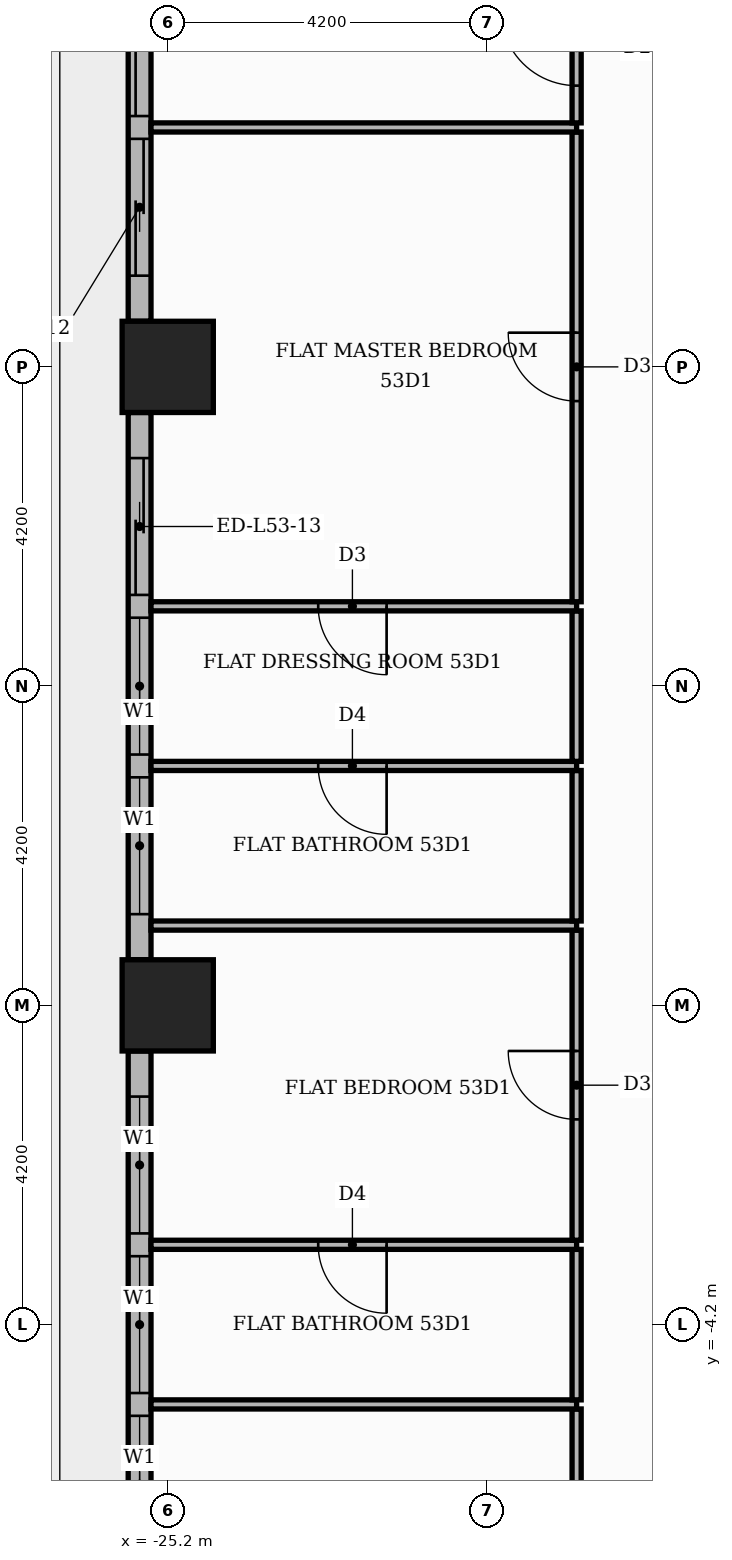
"""IFC4 building model, lengths in metres.
Left out: names, types, materials, properties, quantities, classifications, styles, units other than length and angle.
Written with IfcOpenShell. Run it as: python <this file> out.ifc"""

import sys

from ifc_helpers import new_model, si_unit, direction, frame, frame_2d, origin, origin_2d, place, context, subcontext, project, spatial, rectangle, extrude, element, fill, save


model = new_model("IFC4")
c1 = context("Model", 3, precision=1e-05, world=origin(), true_north=direction((0.0, 1.0)))
c2 = subcontext(c1, "Body", "Model", "MODEL_VIEW")
j1 = project(units=[si_unit("LENGTHUNIT", "METRE"), si_unit("PLANEANGLEUNIT", "RADIAN")], contexts=[c1])
p1 = place(None, origin())
s1 = spatial("IfcSite", under=j1, at=p1, CompositionType="ELEMENT")
p2 = place(p1, origin())
s2 = spatial("IfcBuilding", under=s1, at=p2, CompositionType="ELEMENT")
p3 = place(p2, frame((0.0, 0.0, 223.5)))
s3 = spatial("IfcBuildingStorey", under=s2, at=p3, CompositionType="ELEMENT", Elevation=223.5)
for number, where, z_axis, x_axis in (
    (1, (-25.2, 0.0, 0.0), (0.0, 0.0, 1.0), (1.0, 0.0, 0.0)),
    (2, (-25.2, 8.4, 0.0), (0.0, 0.0, 1.0), (1.0, 0.0, 0.0)),
):
    element("IfcColumn", number, at=place(p3, frame(where, z_axis=z_axis, x_axis=x_axis)), inside=s3, PredefinedType="COLUMN", context=c2, shape_type="SweptSolid", body=[
        extrude(rectangle(XDim=1.2, YDim=1.2, at=origin_2d()), origin(), (0.0, 0.0, 1.0), 3.9),
    ])
p4 = place(p3, frame((-25.57, 16.2, 0.0), z_axis=(0.0, 0.0, 1.0), x_axis=(0.0, -1.0, 0.0)))
e3 = element("IfcWall", 3, at=p4, inside=s3, PredefinedType="STANDARD", context=c2, shape_type="SweptSolid", body=[
    extrude(rectangle(XDim=7.2, YDim=0.3, at=frame_2d((3.6, 0.0))), origin(), (0.0, 0.0, 1.0), 3.48),
])
p5 = place(p4, frame((0.6, 0.0, 0.0)))
e4 = element("IfcOpeningElement", 4, at=p5, cuts=e3, PredefinedType="OPENING", context=c2, shape_type="SweptSolid", body=[
    extrude(rectangle(XDim=3.9, YDim=2.4, at=frame_2d((1.95, 1.2))), frame((0.0, 0.16, 0.0), z_axis=(0.0, -1.0, 0.0), x_axis=(1.0, 0.0, 0.0)), (0.0, 0.0, 1.0), 0.32),
])
p6 = place(p4, frame((4.8, 0.0, 0.0)))
e5 = element("IfcOpeningElement", 5, at=p6, cuts=e3, PredefinedType="OPENING", context=c2, shape_type="SweptSolid", body=[
    extrude(rectangle(XDim=1.8, YDim=2.4, at=frame_2d((0.9, 1.2))), frame((0.0, 0.16, 0.0), z_axis=(0.0, -1.0, 0.0), x_axis=(1.0, 0.0, 0.0)), (0.0, 0.0, 1.0), 0.32),
])
p7 = place(p3, frame((-25.57, 7.8, 0.0), z_axis=(0.0, 0.0, 1.0), x_axis=(0.0, -1.0, 0.0)))
e6 = element("IfcWall", 6, at=p7, inside=s3, PredefinedType="STANDARD", context=c2, shape_type="SweptSolid", body=[
    extrude(rectangle(XDim=7.2, YDim=0.3, at=frame_2d((3.6, 0.0))), origin(), (0.0, 0.0, 1.0), 3.48),
])
p8 = place(p7, frame((0.6, 0.0, 0.0)))
e7 = element("IfcOpeningElement", 7, at=p8, cuts=e6, PredefinedType="OPENING", context=c2, shape_type="SweptSolid", body=[
    extrude(rectangle(XDim=1.8, YDim=2.4, at=frame_2d((0.9, 1.2))), frame((0.0, 0.16, 0.0), z_axis=(0.0, -1.0, 0.0), x_axis=(1.0, 0.0, 0.0)), (0.0, 0.0, 1.0), 0.32),
])
p9 = place(p7, frame((2.7, 0.0, 0.9)))
e8 = element("IfcOpeningElement", 8, at=p9, cuts=e6, PredefinedType="OPENING", context=c2, shape_type="SweptSolid", body=[
    extrude(rectangle(XDim=1.8, YDim=2.1, at=frame_2d((0.9, 1.05))), frame((0.0, 0.16, 0.0), z_axis=(0.0, -1.0, 0.0), x_axis=(1.0, 0.0, 0.0)), (0.0, 0.0, 1.0), 0.32),
])
p10 = place(p7, frame((4.8, 0.0, 0.9)))
e9 = element("IfcOpeningElement", 9, at=p10, cuts=e6, PredefinedType="OPENING", context=c2, shape_type="SweptSolid", body=[
    extrude(rectangle(XDim=1.8, YDim=2.1, at=frame_2d((0.9, 1.05))), frame((0.0, 0.16, 0.0), z_axis=(0.0, -1.0, 0.0), x_axis=(1.0, 0.0, 0.0)), (0.0, 0.0, 1.0), 0.32),
])
p11 = place(p3, frame((-25.57, -0.6, 0.0), z_axis=(0.0, 0.0, 1.0), x_axis=(0.0, -1.0, 0.0)))
e10 = element("IfcWall", 10, at=p11, inside=s3, PredefinedType="STANDARD", context=c2, shape_type="SweptSolid", body=[
    extrude(rectangle(XDim=7.2, YDim=0.3, at=frame_2d((3.6, 0.0))), origin(), (0.0, 0.0, 1.0), 3.48),
])
p12 = place(p11, frame((0.6, 0.0, 0.9)))
e11 = element("IfcOpeningElement", 11, at=p12, cuts=e10, PredefinedType="OPENING", context=c2, shape_type="SweptSolid", body=[
    extrude(rectangle(XDim=1.8, YDim=2.1, at=frame_2d((0.9, 1.05))), frame((0.0, 0.16, 0.0), z_axis=(0.0, -1.0, 0.0), x_axis=(1.0, 0.0, 0.0)), (0.0, 0.0, 1.0), 0.32),
])
p13 = place(p11, frame((2.7, 0.0, 0.9)))
e12 = element("IfcOpeningElement", 12, at=p13, cuts=e10, PredefinedType="OPENING", context=c2, shape_type="SweptSolid", body=[
    extrude(rectangle(XDim=1.8, YDim=2.1, at=frame_2d((0.9, 1.05))), frame((0.0, 0.16, 0.0), z_axis=(0.0, -1.0, 0.0), x_axis=(1.0, 0.0, 0.0)), (0.0, 0.0, 1.0), 0.32),
])
p14 = place(p11, frame((4.8, 0.0, 0.9)))
e13 = element("IfcOpeningElement", 13, at=p14, cuts=e10, PredefinedType="OPENING", context=c2, shape_type="SweptSolid", body=[
    extrude(rectangle(XDim=1.8, YDim=2.1, at=frame_2d((0.9, 1.05))), frame((0.0, 0.16, 0.0), z_axis=(0.0, -1.0, 0.0), x_axis=(1.0, 0.0, 0.0)), (0.0, 0.0, 1.0), 0.32),
])
p15 = place(p3, frame((-19.82, -11.49, 0.0), z_axis=(0.0, 0.0, 1.0), x_axis=(0.0, 1.0, 0.0)))
e14 = element("IfcWall", 14, at=p15, inside=s3, PredefinedType="PARTITIONING", context=c2, shape_type="SweptSolid", body=[
    extrude(rectangle(XDim=6.18, YDim=0.12, at=frame_2d((3.09, 0.0))), origin(), (0.0, 0.0, 1.0), 3.48),
])
p16 = place(p15, frame((2.64, 0.0, 0.0)))
e15 = element("IfcOpeningElement", 15, at=p16, cuts=e14, PredefinedType="OPENING", context=c2, shape_type="SweptSolid", body=[
    extrude(rectangle(XDim=0.9, YDim=2.1, at=frame_2d((0.45, 1.05))), frame((0.0, 0.07, 0.0), z_axis=(0.0, -1.0, 0.0), x_axis=(1.0, 0.0, 0.0)), (0.0, 0.0, 1.0), 0.14),
])
p17 = place(p3, frame((-25.42, -5.25, 0.0), z_axis=(0.0, 0.0, 1.0), x_axis=(1.0, 0.0, 0.0)))
e16 = element("IfcWall", 16, at=p17, inside=s3, PredefinedType="PARTITIONING", context=c2, shape_type="SweptSolid", body=[
    extrude(rectangle(XDim=5.6, YDim=0.12, at=frame_2d((2.8, 0.0))), origin(), (0.0, 0.0, 1.0), 3.48),
])
p18 = place(p3, frame((-19.82, -5.19, 0.0), z_axis=(0.0, 0.0, 1.0), x_axis=(0.0, 1.0, 0.0)))
e17 = element("IfcWall", 17, at=p18, inside=s3, PredefinedType="PARTITIONING", context=c2, shape_type="SweptSolid", body=[
    extrude(rectangle(XDim=1.98, YDim=0.12, at=frame_2d((0.99, 0.0))), origin(), (0.0, 0.0, 1.0), 3.48),
])
p19 = place(p3, frame((-25.42, -3.15, 0.0), z_axis=(0.0, 0.0, 1.0), x_axis=(1.0, 0.0, 0.0)))
e18 = element("IfcWall", 18, at=p19, inside=s3, PredefinedType="PARTITIONING", context=c2, shape_type="SweptSolid", body=[
    extrude(rectangle(XDim=5.6, YDim=0.12, at=frame_2d((2.8, 0.0))), origin(), (0.0, 0.0, 1.0), 3.48),
])
p20 = place(p19, frame((2.2, 0.0, 0.0)))
e19 = element("IfcOpeningElement", 19, at=p20, cuts=e18, PredefinedType="OPENING", context=c2, shape_type="SweptSolid", body=[
    extrude(rectangle(XDim=0.9, YDim=2.1, at=frame_2d((0.45, 1.05))), frame((0.0, 0.07, 0.0), z_axis=(0.0, -1.0, 0.0), x_axis=(1.0, 0.0, 0.0)), (0.0, 0.0, 1.0), 0.14),
])
p21 = place(p3, frame((-19.82, -3.09, 0.0), z_axis=(0.0, 0.0, 1.0), x_axis=(0.0, 1.0, 0.0)))
e20 = element("IfcWall", 20, at=p21, inside=s3, PredefinedType="PARTITIONING", context=c2, shape_type="SweptSolid", body=[
    extrude(rectangle(XDim=4.08, YDim=0.12, at=frame_2d((2.04, 0.0))), origin(), (0.0, 0.0, 1.0), 3.48),
])
p22 = place(p21, frame((1.59, 0.0, 0.0)))
e21 = element("IfcOpeningElement", 21, at=p22, cuts=e20, PredefinedType="OPENING", context=c2, shape_type="SweptSolid", body=[
    extrude(rectangle(XDim=0.9, YDim=2.1, at=frame_2d((0.45, 1.05))), frame((0.0, 0.07, 0.0), z_axis=(0.0, -1.0, 0.0), x_axis=(1.0, 0.0, 0.0)), (0.0, 0.0, 1.0), 0.14),
])
p23 = place(p3, frame((-25.42, 1.05, 0.0), z_axis=(0.0, 0.0, 1.0), x_axis=(1.0, 0.0, 0.0)))
e22 = element("IfcWall", 22, at=p23, inside=s3, PredefinedType="PARTITIONING", context=c2, shape_type="SweptSolid", body=[
    extrude(rectangle(XDim=5.6, YDim=0.12, at=frame_2d((2.8, 0.0))), origin(), (0.0, 0.0, 1.0), 3.48),
])
p24 = place(p3, frame((-19.82, 1.11, 0.0), z_axis=(0.0, 0.0, 1.0), x_axis=(0.0, 1.0, 0.0)))
e23 = element("IfcWall", 23, at=p24, inside=s3, PredefinedType="PARTITIONING", context=c2, shape_type="SweptSolid", body=[
    extrude(rectangle(XDim=1.98, YDim=0.12, at=frame_2d((0.99, 0.0))), origin(), (0.0, 0.0, 1.0), 3.48),
])
p25 = place(p3, frame((-25.42, 3.15, 0.0), z_axis=(0.0, 0.0, 1.0), x_axis=(1.0, 0.0, 0.0)))
e24 = element("IfcWall", 24, at=p25, inside=s3, PredefinedType="PARTITIONING", context=c2, shape_type="SweptSolid", body=[
    extrude(rectangle(XDim=5.6, YDim=0.12, at=frame_2d((2.8, 0.0))), origin(), (0.0, 0.0, 1.0), 3.48),
])
p26 = place(p25, frame((2.2, 0.0, 0.0)))
e25 = element("IfcOpeningElement", 25, at=p26, cuts=e24, PredefinedType="OPENING", context=c2, shape_type="SweptSolid", body=[
    extrude(rectangle(XDim=0.9, YDim=2.1, at=frame_2d((0.45, 1.05))), frame((0.0, 0.07, 0.0), z_axis=(0.0, -1.0, 0.0), x_axis=(1.0, 0.0, 0.0)), (0.0, 0.0, 1.0), 0.14),
])
p27 = place(p3, frame((-19.82, 3.21, 0.0), z_axis=(0.0, 0.0, 1.0), x_axis=(0.0, 1.0, 0.0)))
e26 = element("IfcWall", 26, at=p27, inside=s3, PredefinedType="PARTITIONING", context=c2, shape_type="SweptSolid", body=[
    extrude(rectangle(XDim=1.98, YDim=0.12, at=frame_2d((0.99, 0.0))), origin(), (0.0, 0.0, 1.0), 3.48),
])
p28 = place(p3, frame((-25.42, 5.25, 0.0), z_axis=(0.0, 0.0, 1.0), x_axis=(1.0, 0.0, 0.0)))
e27 = element("IfcWall", 27, at=p28, inside=s3, PredefinedType="PARTITIONING", context=c2, shape_type="SweptSolid", body=[
    extrude(rectangle(XDim=5.6, YDim=0.12, at=frame_2d((2.8, 0.0))), origin(), (0.0, 0.0, 1.0), 3.48),
])
p29 = place(p28, frame((2.2, 0.0, 0.0)))
e28 = element("IfcOpeningElement", 28, at=p29, cuts=e27, PredefinedType="OPENING", context=c2, shape_type="SweptSolid", body=[
    extrude(rectangle(XDim=0.9, YDim=2.1, at=frame_2d((0.45, 1.05))), frame((0.0, 0.07, 0.0), z_axis=(0.0, -1.0, 0.0), x_axis=(1.0, 0.0, 0.0)), (0.0, 0.0, 1.0), 0.14),
])
p30 = place(p3, frame((-19.82, 5.31, 0.0), z_axis=(0.0, 0.0, 1.0), x_axis=(0.0, 1.0, 0.0)))
e29 = element("IfcWall", 29, at=p30, inside=s3, PredefinedType="PARTITIONING", context=c2, shape_type="SweptSolid", body=[
    extrude(rectangle(XDim=6.18, YDim=0.12, at=frame_2d((3.09, 0.0))), origin(), (0.0, 0.0, 1.0), 3.48),
])
p31 = place(p30, frame((2.64, 0.0, 0.0)))
e30 = element("IfcOpeningElement", 30, at=p31, cuts=e29, PredefinedType="OPENING", context=c2, shape_type="SweptSolid", body=[
    extrude(rectangle(XDim=0.9, YDim=2.1, at=frame_2d((0.45, 1.05))), frame((0.0, 0.07, 0.0), z_axis=(0.0, -1.0, 0.0), x_axis=(1.0, 0.0, 0.0)), (0.0, 0.0, 1.0), 0.14),
])
p32 = place(p3, frame((-25.42, 11.55, 0.0), z_axis=(0.0, 0.0, 1.0), x_axis=(1.0, 0.0, 0.0)))
e31 = element("IfcWall", 31, at=p32, inside=s3, PredefinedType="PARTITIONING", context=c2, shape_type="SweptSolid", body=[
    extrude(rectangle(XDim=5.6, YDim=0.12, at=frame_2d((2.8, 0.0))), origin(), (0.0, 0.0, 1.0), 3.48),
])
p33 = place(p3, frame((-19.82, 11.61, 0.0), z_axis=(0.0, 0.0, 1.0), x_axis=(0.0, 1.0, 0.0)))
e32 = element("IfcWall", 32, at=p33, inside=s3, PredefinedType="PARTITIONING", context=c2, shape_type="SweptSolid", body=[
    extrude(rectangle(XDim=1.98, YDim=0.12, at=frame_2d((0.99, 0.0))), origin(), (0.0, 0.0, 1.0), 3.48),
])
p34 = place(p33, frame((0.49, 0.0, 0.0)))
e33 = element("IfcOpeningElement", 33, at=p34, cuts=e32, PredefinedType="OPENING", context=c2, shape_type="SweptSolid", body=[
    extrude(rectangle(XDim=1.0, YDim=2.1, at=frame_2d((0.5, 1.05))), frame((0.0, 0.07, 0.0), z_axis=(0.0, -1.0, 0.0), x_axis=(1.0, 0.0, 0.0)), (0.0, 0.0, 1.0), 0.14),
])
p35 = place(p5, origin())
e34 = element("IfcDoor", 34, at=p35, inside=s3, OperationType="SLIDING_TO_LEFT", PredefinedType="DOOR", context=c2, shape_type="SweptSolid", body=[
    extrude(rectangle(XDim=3.9, YDim=2.4, at=frame_2d((1.95, 1.2))), frame((0.0, 0.025, 0.0), z_axis=(0.0, -1.0, 0.0), x_axis=(1.0, 0.0, 0.0)), (0.0, 0.0, 1.0), 0.05),
])
fill(e4, e34)
p36 = place(p6, origin())
e35 = element("IfcDoor", 35, at=p36, inside=s3, OperationType="SLIDING_TO_RIGHT", PredefinedType="DOOR", context=c2, shape_type="SweptSolid", body=[
    extrude(rectangle(XDim=1.8, YDim=2.4, at=frame_2d((0.9, 1.2))), frame((0.0, 0.025, 0.0), z_axis=(0.0, -1.0, 0.0), x_axis=(1.0, 0.0, 0.0)), (0.0, 0.0, 1.0), 0.05),
])
fill(e5, e35)
p37 = place(p8, origin())
e36 = element("IfcDoor", 36, at=p37, inside=s3, OperationType="SLIDING_TO_LEFT", PredefinedType="DOOR", context=c2, shape_type="SweptSolid", body=[
    extrude(rectangle(XDim=1.8, YDim=2.4, at=frame_2d((0.9, 1.2))), frame((0.0, 0.025, 0.0), z_axis=(0.0, -1.0, 0.0), x_axis=(1.0, 0.0, 0.0)), (0.0, 0.0, 1.0), 0.05),
])
fill(e7, e36)
p38 = place(p9, origin())
e37 = element("IfcWindow", 37, at=p38, inside=s3, PartitioningType="SINGLE_PANEL", PredefinedType="WINDOW", context=c2, shape_type="SweptSolid", body=[
    extrude(rectangle(XDim=1.8, YDim=2.1, at=frame_2d((0.9, 1.05))), frame((0.0, 0.03, 0.0), z_axis=(0.0, -1.0, 0.0), x_axis=(1.0, 0.0, 0.0)), (0.0, 0.0, 1.0), 0.06),
])
fill(e8, e37)
p39 = place(p10, origin())
e38 = element("IfcWindow", 38, at=p39, inside=s3, PartitioningType="SINGLE_PANEL", PredefinedType="WINDOW", context=c2, shape_type="SweptSolid", body=[
    extrude(rectangle(XDim=1.8, YDim=2.1, at=frame_2d((0.9, 1.05))), frame((0.0, 0.03, 0.0), z_axis=(0.0, -1.0, 0.0), x_axis=(1.0, 0.0, 0.0)), (0.0, 0.0, 1.0), 0.06),
])
fill(e9, e38)
p40 = place(p12, origin())
e39 = element("IfcWindow", 39, at=p40, inside=s3, PartitioningType="SINGLE_PANEL", PredefinedType="WINDOW", context=c2, shape_type="SweptSolid", body=[
    extrude(rectangle(XDim=1.8, YDim=2.1, at=frame_2d((0.9, 1.05))), frame((0.0, 0.03, 0.0), z_axis=(0.0, -1.0, 0.0), x_axis=(1.0, 0.0, 0.0)), (0.0, 0.0, 1.0), 0.06),
])
fill(e11, e39)
p41 = place(p13, origin())
e40 = element("IfcWindow", 40, at=p41, inside=s3, PartitioningType="SINGLE_PANEL", PredefinedType="WINDOW", context=c2, shape_type="SweptSolid", body=[
    extrude(rectangle(XDim=1.8, YDim=2.1, at=frame_2d((0.9, 1.05))), frame((0.0, 0.03, 0.0), z_axis=(0.0, -1.0, 0.0), x_axis=(1.0, 0.0, 0.0)), (0.0, 0.0, 1.0), 0.06),
])
fill(e12, e40)
p42 = place(p14, origin())
e41 = element("IfcWindow", 41, at=p42, inside=s3, PartitioningType="SINGLE_PANEL", PredefinedType="WINDOW", context=c2, shape_type="SweptSolid", body=[
    extrude(rectangle(XDim=1.8, YDim=2.1, at=frame_2d((0.9, 1.05))), frame((0.0, 0.03, 0.0), z_axis=(0.0, -1.0, 0.0), x_axis=(1.0, 0.0, 0.0)), (0.0, 0.0, 1.0), 0.06),
])
fill(e13, e41)
p43 = place(p34, origin())
e42 = element("IfcDoor", 42, at=p43, inside=s3, OperationType="SINGLE_SWING_RIGHT", PredefinedType="DOOR", context=c2, shape_type="SweptSolid", body=[
    extrude(rectangle(XDim=1.0, YDim=2.1, at=frame_2d((0.5, 1.05))), frame((0.0, 0.025, 0.0), z_axis=(0.0, -1.0, 0.0), x_axis=(1.0, 0.0, 0.0)), (0.0, 0.0, 1.0), 0.05),
])
fill(e33, e42)
p44 = place(p31, origin())
e43 = element("IfcDoor", 43, at=p44, inside=s3, OperationType="SINGLE_SWING_RIGHT", PredefinedType="DOOR", context=c2, shape_type="SweptSolid", body=[
    extrude(rectangle(XDim=0.9, YDim=2.1, at=frame_2d((0.45, 1.05))), frame((0.0, 0.025, 0.0), z_axis=(0.0, -1.0, 0.0), x_axis=(1.0, 0.0, 0.0)), (0.0, 0.0, 1.0), 0.05),
])
fill(e30, e43)
p45 = place(p29, frame((0.9, 0.0, 0.0), z_axis=(0.0, 0.0, 1.0), x_axis=(-1.0, 0.0, 0.0)))
e44 = element("IfcDoor", 44, at=p45, inside=s3, OperationType="SINGLE_SWING_RIGHT", PredefinedType="DOOR", context=c2, shape_type="SweptSolid", body=[
    extrude(rectangle(XDim=0.9, YDim=2.1, at=frame_2d((0.45, 1.05))), frame((0.0, 0.025, 0.0), z_axis=(0.0, -1.0, 0.0), x_axis=(1.0, 0.0, 0.0)), (0.0, 0.0, 1.0), 0.05),
])
fill(e28, e44)
p46 = place(p26, frame((0.9, 0.0, 0.0), z_axis=(0.0, 0.0, 1.0), x_axis=(-1.0, 0.0, 0.0)))
e45 = element("IfcDoor", 45, at=p46, inside=s3, OperationType="SINGLE_SWING_RIGHT", PredefinedType="DOOR", context=c2, shape_type="SweptSolid", body=[
    extrude(rectangle(XDim=0.9, YDim=2.1, at=frame_2d((0.45, 1.05))), frame((0.0, 0.025, 0.0), z_axis=(0.0, -1.0, 0.0), x_axis=(1.0, 0.0, 0.0)), (0.0, 0.0, 1.0), 0.05),
])
fill(e25, e45)
p47 = place(p22, origin())
e46 = element("IfcDoor", 46, at=p47, inside=s3, OperationType="SINGLE_SWING_RIGHT", PredefinedType="DOOR", context=c2, shape_type="SweptSolid", body=[
    extrude(rectangle(XDim=0.9, YDim=2.1, at=frame_2d((0.45, 1.05))), frame((0.0, 0.025, 0.0), z_axis=(0.0, -1.0, 0.0), x_axis=(1.0, 0.0, 0.0)), (0.0, 0.0, 1.0), 0.05),
])
fill(e21, e46)
p48 = place(p20, frame((0.9, 0.0, 0.0), z_axis=(0.0, 0.0, 1.0), x_axis=(-1.0, 0.0, 0.0)))
e47 = element("IfcDoor", 47, at=p48, inside=s3, OperationType="SINGLE_SWING_RIGHT", PredefinedType="DOOR", context=c2, shape_type="SweptSolid", body=[
    extrude(rectangle(XDim=0.9, YDim=2.1, at=frame_2d((0.45, 1.05))), frame((0.0, 0.025, 0.0), z_axis=(0.0, -1.0, 0.0), x_axis=(1.0, 0.0, 0.0)), (0.0, 0.0, 1.0), 0.05),
])
fill(e19, e47)
save(model, sys.argv[1])
